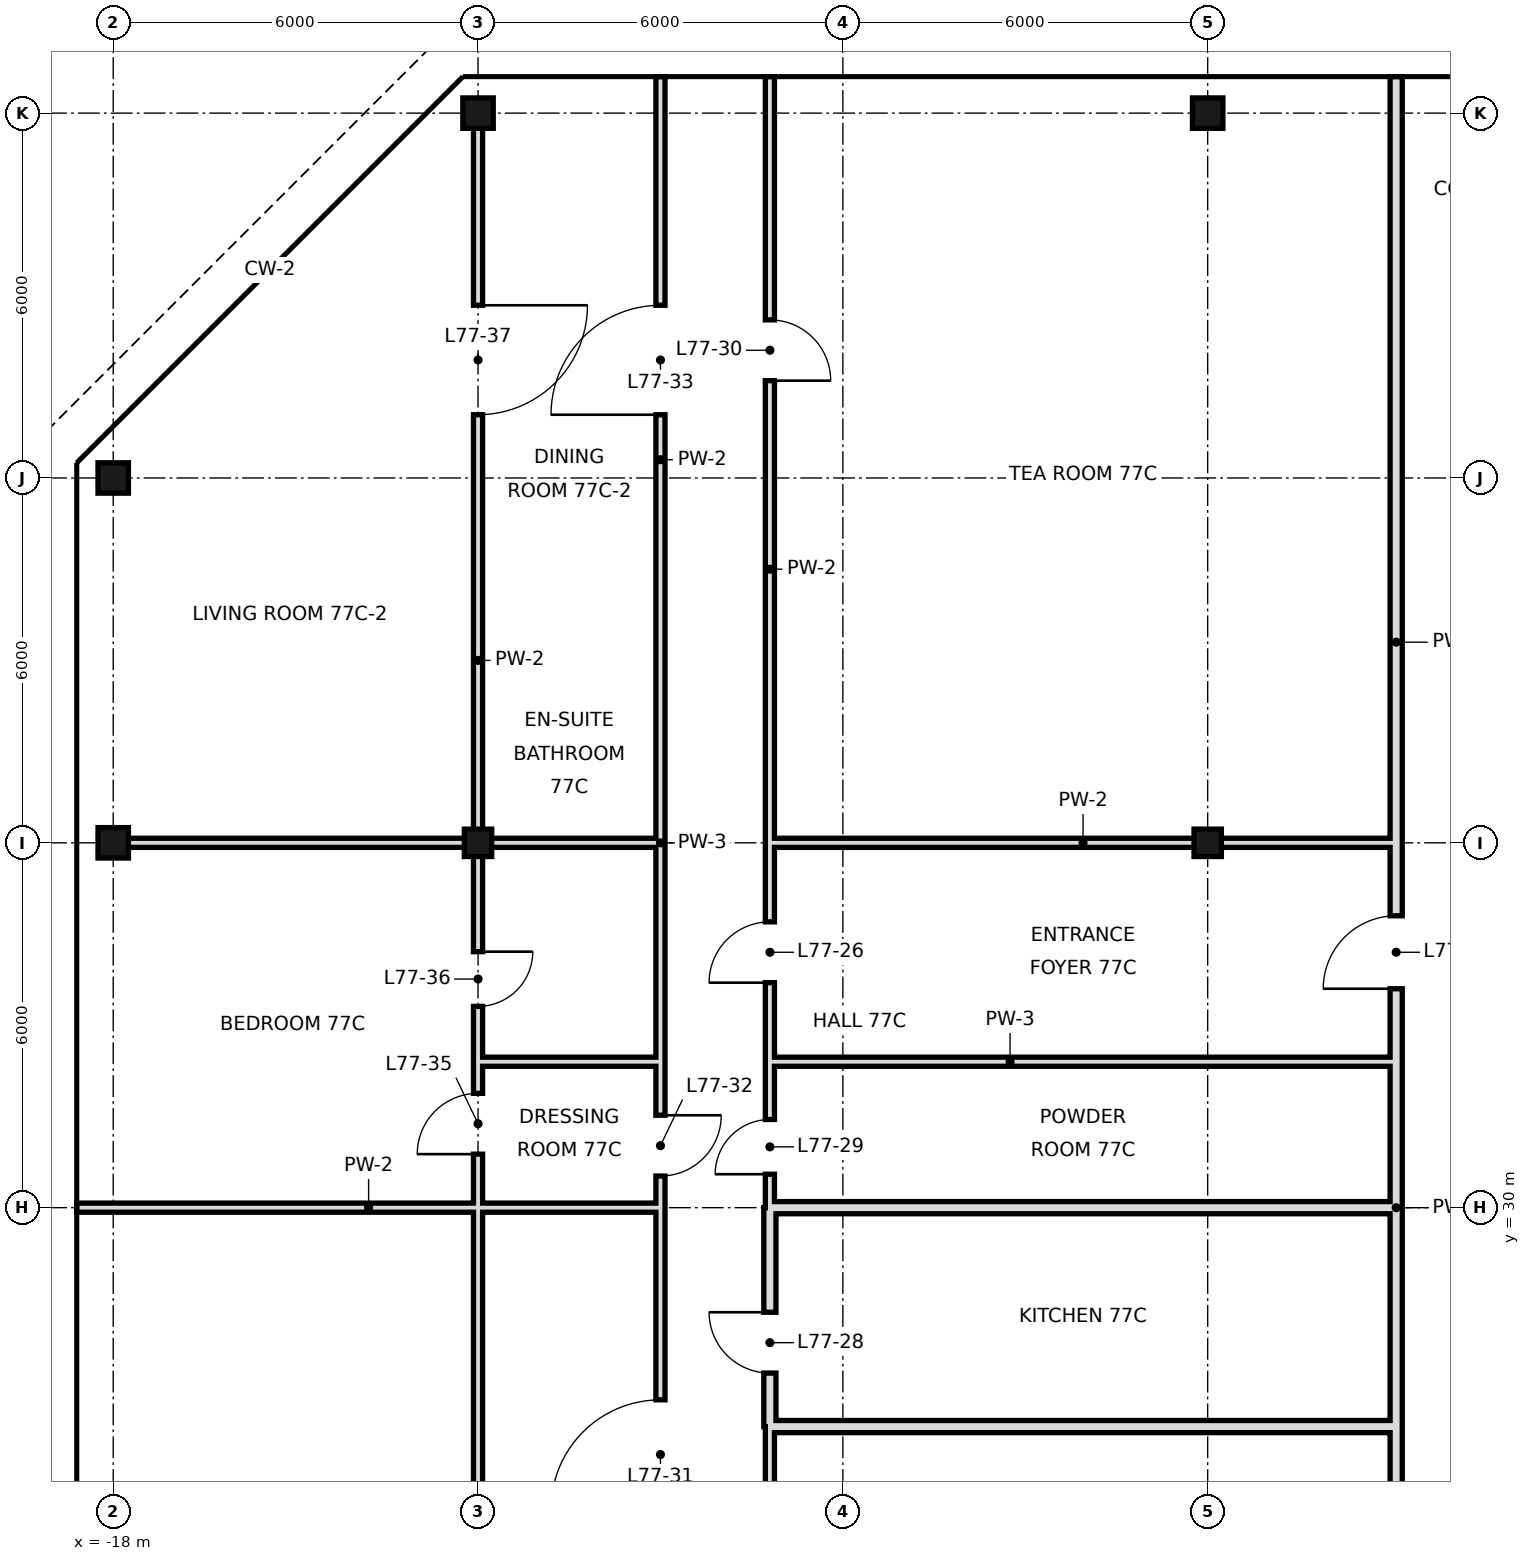
"""IFC4 building model, lengths in metres.
Left out: names, types, materials, properties, quantities, classifications, styles, units other than length and angle.
Written with IfcOpenShell. Run it as: python <this file> out.ifc"""

import sys

from ifc_helpers import new_model, si_unit, direction, frame, frame_2d, origin, origin_2d, place, context, subcontext, project, spatial, rectangle, hollow_rectangle, extrude, element, fill, save


model = new_model("IFC4")
c1 = context("Model", 3, precision=1e-05, world=origin(), true_north=direction((0.0, 1.0)))
c2 = subcontext(c1, "Body", "Model", "MODEL_VIEW")
j1 = project(units=[si_unit("LENGTHUNIT", "METRE"), si_unit("PLANEANGLEUNIT", "RADIAN")], contexts=[c1])
p1 = place(None, origin())
s1 = spatial("IfcSite", under=j1, at=p1, CompositionType="ELEMENT")
p2 = place(p1, origin())
s2 = spatial("IfcBuilding", under=s1, at=p2, CompositionType="ELEMENT")
p3 = place(p2, frame((0.0, 0.0, 323.2)))
s3 = spatial("IfcBuildingStorey", under=s2, at=p3, CompositionType="ELEMENT", Elevation=323.2)
for number, where, z_axis, x_axis in (
    (1, (-18.0, 36.0, 0.0), (0.0, 0.0, 1.0), (1.0, 0.0, 0.0)),
    (2, (-18.0, 42.0, 0.0), (0.0, 0.0, 1.0), (1.0, 0.0, 0.0)),
):
    element("IfcColumn", number, at=place(p3, frame(where, z_axis=z_axis, x_axis=x_axis)), inside=s3, PredefinedType="COLUMN", context=c2, shape_type="SweptSolid", body=[
        extrude(hollow_rectangle(XDim=0.5, YDim=0.5, WallThickness=0.025, at=origin_2d()), origin(), (0.0, 0.0, 1.0), 3.6),
    ])
p4 = place(p3, frame((-12.0, 36.0, 0.0), z_axis=(0.0, 0.0, 1.0), x_axis=(1.0, 0.0, 0.0)))
e3 = element("IfcColumn", 3, at=p4, inside=s3, PredefinedType="COLUMN", context=c2, shape_type="SweptSolid", body=[
    extrude(hollow_rectangle(XDim=0.45, YDim=0.45, WallThickness=0.022, at=origin_2d()), origin(), (0.0, 0.0, 1.0), 3.6),
])
p5 = place(p3, frame((-12.0, 48.0, 0.0), z_axis=(0.0, 0.0, 1.0), x_axis=(1.0, 0.0, 0.0)))
e4 = element("IfcColumn", 4, at=p5, inside=s3, PredefinedType="COLUMN", context=c2, shape_type="SweptSolid", body=[
    extrude(hollow_rectangle(XDim=0.5, YDim=0.5, WallThickness=0.025, at=origin_2d()), origin(), (0.0, 0.0, 1.0), 3.6),
])
p6 = place(p3, frame((0.0, 36.0, 0.0), z_axis=(0.0, 0.0, 1.0), x_axis=(1.0, 0.0, 0.0)))
e5 = element("IfcColumn", 5, at=p6, inside=s3, PredefinedType="COLUMN", context=c2, shape_type="SweptSolid", body=[
    extrude(hollow_rectangle(XDim=0.45, YDim=0.45, WallThickness=0.022, at=origin_2d()), origin(), (0.0, 0.0, 1.0), 3.6),
])
p7 = place(p3, frame((0.0, 48.0, 0.0), z_axis=(0.0, 0.0, 1.0), x_axis=(1.0, 0.0, 0.0)))
e6 = element("IfcColumn", 6, at=p7, inside=s3, PredefinedType="COLUMN", context=c2, shape_type="SweptSolid", body=[
    extrude(hollow_rectangle(XDim=0.5, YDim=0.5, WallThickness=0.025, at=origin_2d()), origin(), (0.0, 0.0, 1.0), 3.6),
])
p8 = place(p3, frame((-12.0, 18.0, 0.0), z_axis=(0.0, 0.0, 1.0), x_axis=(0.0, 1.0, 0.0)))
e7 = element("IfcWall", 7, at=p8, inside=s3, PredefinedType="PARTITIONING", context=c2, shape_type="SweptSolid", body=[
    extrude(rectangle(XDim=14.4, YDim=0.15, at=frame_2d((7.2, 0.0))), origin(), (0.0, 0.0, 1.0), 2.72),
])
p9 = place(p8, frame((3.16, 0.0, 0.0)))
e8 = element("IfcOpeningElement", 8, at=p9, cuts=e7, PredefinedType="OPENING", context=c2, shape_type="SweptSolid", body=[
    extrude(rectangle(XDim=1.8, YDim=2.4, at=frame_2d((0.9, 1.2))), frame((0.0, 0.085, 0.0), z_axis=(0.0, -1.0, 0.0), x_axis=(1.0, 0.0, 0.0)), (0.0, 0.0, 1.0), 0.17),
])
p10 = place(p8, frame((12.88, 0.0, 0.0)))
e9 = element("IfcOpeningElement", 9, at=p10, cuts=e7, PredefinedType="OPENING", context=c2, shape_type="SweptSolid", body=[
    extrude(rectangle(XDim=1.0, YDim=2.4, at=frame_2d((0.5, 1.2))), frame((0.0, 0.085, 0.0), z_axis=(0.0, -1.0, 0.0), x_axis=(1.0, 0.0, 0.0)), (0.0, 0.0, 1.0), 0.17),
])
p11 = place(p3, frame((-12.0, 36.0, 0.0), z_axis=(0.0, 0.0, 1.0), x_axis=(0.0, 1.0, 0.0)))
e10 = element("IfcWall", 10, at=p11, inside=s3, PredefinedType="PARTITIONING", context=c2, shape_type="SweptSolid", body=[
    extrude(rectangle(XDim=12.0, YDim=0.15, at=frame_2d((6.0, 0.0))), origin(), (0.0, 0.0, 1.0), 2.72),
])
p12 = place(p11, frame((7.04, 0.0, 0.0)))
e11 = element("IfcOpeningElement", 11, at=p12, cuts=e10, PredefinedType="OPENING", context=c2, shape_type="SweptSolid", body=[
    extrude(rectangle(XDim=1.8, YDim=2.4, at=frame_2d((0.9, 1.2))), frame((0.0, 0.085, 0.0), z_axis=(0.0, -1.0, 0.0), x_axis=(1.0, 0.0, 0.0)), (0.0, 0.0, 1.0), 0.17),
])
p13 = place(p3, frame((-12.0, 32.4, 0.0), z_axis=(0.0, 0.0, 1.0), x_axis=(0.0, 1.0, 0.0)))
e12 = element("IfcWall", 12, at=p13, inside=s3, PredefinedType="PARTITIONING", context=c2, shape_type="SweptSolid", body=[
    extrude(rectangle(XDim=3.6, YDim=0.15, at=frame_2d((1.8, 0.0))), origin(), (0.0, 0.0, 1.0), 2.72),
])
p14 = place(p13, frame((0.91, 0.0, 0.0)))
e13 = element("IfcOpeningElement", 13, at=p14, cuts=e12, PredefinedType="OPENING", context=c2, shape_type="SweptSolid", body=[
    extrude(rectangle(XDim=0.9, YDim=2.4, at=frame_2d((0.45, 1.2))), frame((0.0, 0.085, 0.0), z_axis=(0.0, -1.0, 0.0), x_axis=(1.0, 0.0, 0.0)), (0.0, 0.0, 1.0), 0.17),
])
p15 = place(p3, frame((-7.2, 26.4, 0.0), z_axis=(0.0, 0.0, 1.0), x_axis=(0.0, 1.0, 0.0)))
e14 = element("IfcWall", 14, at=p15, inside=s3, PredefinedType="SOLIDWALL", context=c2, shape_type="SweptSolid", body=[
    extrude(rectangle(XDim=3.6, YDim=0.2, at=frame_2d((1.8, 0.0))), origin(), (0.0, 0.0, 1.0), 2.72),
])
p16 = place(p15, frame((0.88, 0.0, 0.0)))
e15 = element("IfcOpeningElement", 15, at=p16, cuts=e14, PredefinedType="OPENING", context=c2, shape_type="SweptSolid", body=[
    extrude(rectangle(XDim=1.0, YDim=2.4, at=frame_2d((0.5, 1.2))), frame((0.0, 0.11, 0.0), z_axis=(0.0, -1.0, 0.0), x_axis=(1.0, 0.0, 0.0)), (0.0, 0.0, 1.0), 0.22),
])
p17 = place(p3, frame((-7.2, 18.0, 0.0), z_axis=(0.0, 0.0, 1.0), x_axis=(0.0, 1.0, 0.0)))
e16 = element("IfcWall", 16, at=p17, inside=s3, PredefinedType="PARTITIONING", context=c2, shape_type="SweptSolid", body=[
    extrude(rectangle(XDim=8.4, YDim=0.15, at=frame_2d((4.2, 0.0))), origin(), (0.0, 0.0, 1.0), 3.42),
])
p18 = place(p17, frame((5.08, 0.0, 0.0)))
e17 = element("IfcOpeningElement", 17, at=p18, cuts=e16, PredefinedType="OPENING", context=c2, shape_type="SweptSolid", body=[
    extrude(rectangle(XDim=1.0, YDim=2.4, at=frame_2d((0.5, 1.2))), frame((0.0, 0.085, 0.0), z_axis=(0.0, -1.0, 0.0), x_axis=(1.0, 0.0, 0.0)), (0.0, 0.0, 1.0), 0.17),
])
p19 = place(p3, frame((-7.2, 32.4, 0.0), z_axis=(0.0, 0.0, 1.0), x_axis=(0.0, 1.0, 0.0)))
e18 = element("IfcWall", 18, at=p19, inside=s3, PredefinedType="PARTITIONING", context=c2, shape_type="SweptSolid", body=[
    extrude(rectangle(XDim=16.2, YDim=0.15, at=frame_2d((8.1, 0.0))), origin(), (0.0, 0.0, 1.0), 3.42),
])
p20 = place(p19, frame((1.3, 0.0, 0.0)))
e19 = element("IfcOpeningElement", 19, at=p20, cuts=e18, PredefinedType="OPENING", context=c2, shape_type="SweptSolid", body=[
    extrude(rectangle(XDim=1.0, YDim=2.4, at=frame_2d((0.5, 1.2))), frame((0.0, 0.085, 0.0), z_axis=(0.0, -1.0, 0.0), x_axis=(1.0, 0.0, 0.0)), (0.0, 0.0, 1.0), 0.17),
])
p21 = place(p19, frame((11.2, 0.0, 0.0)))
e20 = element("IfcOpeningElement", 20, at=p21, cuts=e18, PredefinedType="OPENING", context=c2, shape_type="SweptSolid", body=[
    extrude(rectangle(XDim=1.0, YDim=2.4, at=frame_2d((0.5, 1.2))), frame((0.0, 0.085, 0.0), z_axis=(0.0, -1.0, 0.0), x_axis=(1.0, 0.0, 0.0)), (0.0, 0.0, 1.0), 0.17),
])
p22 = place(p3, frame((-7.2, 30.0, 0.0), z_axis=(0.0, 0.0, 1.0), x_axis=(0.0, 1.0, 0.0)))
e21 = element("IfcWall", 21, at=p22, inside=s3, PredefinedType="PARTITIONING", context=c2, shape_type="SweptSolid", body=[
    extrude(rectangle(XDim=2.4, YDim=0.15, at=frame_2d((1.2, 0.0))), origin(), (0.0, 0.0, 1.0), 3.42),
])
p23 = place(p22, frame((0.55, 0.0, 0.0)))
e22 = element("IfcOpeningElement", 22, at=p23, cuts=e21, PredefinedType="OPENING", context=c2, shape_type="SweptSolid", body=[
    extrude(rectangle(XDim=0.9, YDim=2.4, at=frame_2d((0.45, 1.2))), frame((0.0, 0.085, 0.0), z_axis=(0.0, -1.0, 0.0), x_axis=(1.0, 0.0, 0.0)), (0.0, 0.0, 1.0), 0.17),
])
p24 = place(p3, frame((-9.0, 18.0, 0.0), z_axis=(0.0, 0.0, 1.0), x_axis=(0.0, 1.0, 0.0)))
e23 = element("IfcWall", 23, at=p24, inside=s3, PredefinedType="PARTITIONING", context=c2, shape_type="SweptSolid", body=[
    extrude(rectangle(XDim=14.4, YDim=0.15, at=frame_2d((7.2, 0.0))), origin(), (0.0, 0.0, 1.0), 3.42),
])
p25 = place(p24, frame((7.04, 0.0, 0.0)))
e24 = element("IfcOpeningElement", 24, at=p25, cuts=e23, PredefinedType="OPENING", context=c2, shape_type="SweptSolid", body=[
    extrude(rectangle(XDim=1.8, YDim=2.4, at=frame_2d((0.9, 1.2))), frame((0.0, 0.085, 0.0), z_axis=(0.0, -1.0, 0.0), x_axis=(1.0, 0.0, 0.0)), (0.0, 0.0, 1.0), 0.17),
])
p26 = place(p24, frame((12.52, 0.0, 0.0)))
e25 = element("IfcOpeningElement", 25, at=p26, cuts=e23, PredefinedType="OPENING", context=c2, shape_type="SweptSolid", body=[
    extrude(rectangle(XDim=1.0, YDim=2.4, at=frame_2d((0.5, 1.2))), frame((0.0, 0.085, 0.0), z_axis=(0.0, -1.0, 0.0), x_axis=(1.0, 0.0, 0.0)), (0.0, 0.0, 1.0), 0.17),
])
p27 = place(p3, frame((-9.0, 36.0, 0.0), z_axis=(0.0, 0.0, 1.0), x_axis=(0.0, 1.0, 0.0)))
e26 = element("IfcWall", 26, at=p27, inside=s3, PredefinedType="PARTITIONING", context=c2, shape_type="SweptSolid", body=[
    extrude(rectangle(XDim=12.6, YDim=0.15, at=frame_2d((6.3, 0.0))), origin(), (0.0, 0.0, 1.0), 3.42),
])
p28 = place(p27, frame((7.04, 0.0, 0.0)))
e27 = element("IfcOpeningElement", 27, at=p28, cuts=e26, PredefinedType="OPENING", context=c2, shape_type="SweptSolid", body=[
    extrude(rectangle(XDim=1.8, YDim=2.4, at=frame_2d((0.9, 1.2))), frame((0.0, 0.085, 0.0), z_axis=(0.0, -1.0, 0.0), x_axis=(1.0, 0.0, 0.0)), (0.0, 0.0, 1.0), 0.17),
])
p29 = place(p3, frame((-9.0, 32.4, 0.0), z_axis=(0.0, 0.0, 1.0), x_axis=(0.0, 1.0, 0.0)))
e28 = element("IfcWall", 28, at=p29, inside=s3, PredefinedType="PARTITIONING", context=c2, shape_type="SweptSolid", body=[
    extrude(rectangle(XDim=3.6, YDim=0.15, at=frame_2d((1.8, 0.0))), origin(), (0.0, 0.0, 1.0), 3.42),
])
p30 = place(p3, frame((3.1, 18.7, 0.0), z_axis=(0.0, 0.0, 1.0), x_axis=(0.0, 1.0, 0.0)))
e29 = element("IfcWall", 29, at=p30, inside=s3, PredefinedType="SOLIDWALL", context=c2, shape_type="SweptSolid", body=[
    extrude(rectangle(XDim=7.7, YDim=0.2, at=frame_2d((3.85, 0.0))), origin(), (0.0, 0.0, 1.0), 3.42),
])
p31 = place(p3, frame((3.1, 30.0, 0.0), z_axis=(0.0, 0.0, 1.0), x_axis=(0.0, 1.0, 0.0)))
e30 = element("IfcWall", 30, at=p31, inside=s3, PredefinedType="SOLIDWALL", context=c2, shape_type="SweptSolid", body=[
    extrude(rectangle(XDim=18.6, YDim=0.2, at=frame_2d((9.3, 0.0))), origin(), (0.0, 0.0, 1.0), 2.72),
])
p32 = place(p31, frame((3.6, 0.0, 0.0)))
e31 = element("IfcOpeningElement", 31, at=p32, cuts=e30, PredefinedType="OPENING", context=c2, shape_type="SweptSolid", body=[
    extrude(rectangle(XDim=1.2, YDim=2.4, at=frame_2d((0.6, 1.2))), frame((0.0, 0.11, 0.0), z_axis=(0.0, -1.0, 0.0), x_axis=(1.0, 0.0, 0.0)), (0.0, 0.0, 1.0), 0.22),
])
p33 = place(p3, frame((3.1, 26.4, 0.0), z_axis=(0.0, 0.0, 1.0), x_axis=(0.0, 1.0, 0.0)))
e32 = element("IfcWall", 32, at=p33, inside=s3, PredefinedType="SOLIDWALL", context=c2, shape_type="SweptSolid", body=[
    extrude(rectangle(XDim=3.6, YDim=0.2, at=frame_2d((1.8, 0.0))), origin(), (0.0, 0.0, 1.0), 2.97),
])
for number, where, z_axis, x_axis in (
    (33, (-7.2, 26.4, 0.0), (0.0, 0.0, 1.0), (1.0, 0.0, 0.0)),
    (34, (-7.2, 30.0, 0.0), (0.0, 0.0, 1.0), (1.0, 0.0, 0.0)),
):
    element("IfcWall", number, at=place(p3, frame(where, z_axis=z_axis, x_axis=x_axis)), inside=s3, PredefinedType="SOLIDWALL", context=c2, shape_type="SweptSolid", body=[
        extrude(rectangle(XDim=10.3, YDim=0.2, at=frame_2d((5.15, 0.0))), origin(), (0.0, 0.0, 1.0), 2.72),
    ])
p34 = place(p3, frame((-18.6, 30.0, 0.0), z_axis=(0.0, 0.0, 1.0), x_axis=(1.0, 0.0, 0.0)))
e35 = element("IfcWall", 35, at=p34, inside=s3, PredefinedType="PARTITIONING", context=c2, shape_type="SweptSolid", body=[
    extrude(rectangle(XDim=9.6, YDim=0.15, at=frame_2d((4.8, 0.0))), origin(), (0.0, 0.0, 1.0), 2.72),
])
p35 = place(p3, frame((-12.0, 32.4, 0.0), z_axis=(0.0, 0.0, 1.0), x_axis=(1.0, 0.0, 0.0)))
e36 = element("IfcWall", 36, at=p35, inside=s3, PredefinedType="PARTITIONING", context=c2, shape_type="SweptSolid", body=[
    extrude(rectangle(XDim=3.0, YDim=0.15, at=frame_2d((1.5, 0.0))), origin(), (0.0, 0.0, 1.0), 3.42),
])
p36 = place(p3, frame((-7.2, 32.4, 0.0), z_axis=(0.0, 0.0, 1.0), x_axis=(1.0, 0.0, 0.0)))
e37 = element("IfcWall", 37, at=p36, inside=s3, PredefinedType="PARTITIONING", context=c2, shape_type="SweptSolid", body=[
    extrude(rectangle(XDim=10.3, YDim=0.15, at=frame_2d((5.15, 0.0))), origin(), (0.0, 0.0, 1.0), 3.42),
])
p37 = place(p3, frame((-18.0, 36.0, 0.0), z_axis=(0.0, 0.0, 1.0), x_axis=(1.0, 0.0, 0.0)))
e38 = element("IfcWall", 38, at=p37, inside=s3, PredefinedType="PARTITIONING", context=c2, shape_type="SweptSolid", body=[
    extrude(rectangle(XDim=6.0, YDim=0.15, at=frame_2d((3.0, 0.0))), origin(), (0.0, 0.0, 1.0), 2.97),
])
p38 = place(p3, frame((-7.2, 36.0, 0.0), z_axis=(0.0, 0.0, 1.0), x_axis=(1.0, 0.0, 0.0)))
e39 = element("IfcWall", 39, at=p38, inside=s3, PredefinedType="PARTITIONING", context=c2, shape_type="SweptSolid", body=[
    extrude(rectangle(XDim=10.3, YDim=0.15, at=frame_2d((5.15, 0.0))), origin(), (0.0, 0.0, 1.0), 2.72),
])
p39 = place(p3, frame((-12.0, 36.0, 0.0), z_axis=(0.0, 0.0, 1.0), x_axis=(1.0, 0.0, 0.0)))
e40 = element("IfcWall", 40, at=p39, inside=s3, PredefinedType="PARTITIONING", context=c2, shape_type="SweptSolid", body=[
    extrude(rectangle(XDim=3.0, YDim=0.15, at=frame_2d((1.5, 0.0))), origin(), (0.0, 0.0, 1.0), 2.72),
])
p40 = place(p20, origin())
e41 = element("IfcDoor", 41, at=p40, inside=s3, OperationType="SINGLE_SWING_LEFT", PredefinedType="DOOR", context=c2, shape_type="SweptSolid", body=[
    extrude(rectangle(XDim=1.0, YDim=2.4, at=frame_2d((0.5, 1.2))), frame((0.0, 0.025, 0.0), z_axis=(0.0, -1.0, 0.0), x_axis=(1.0, 0.0, 0.0)), (0.0, 0.0, 1.0), 0.05),
])
fill(e19, e41)
p41 = place(p16, frame((1.0, 0.0, 0.0), z_axis=(0.0, 0.0, 1.0), x_axis=(-1.0, 0.0, 0.0)))
e42 = element("IfcDoor", 42, at=p41, inside=s3, OperationType="SINGLE_SWING_LEFT", PredefinedType="DOOR", context=c2, shape_type="SweptSolid", body=[
    extrude(rectangle(XDim=1.0, YDim=2.4, at=frame_2d((0.5, 1.2))), frame((0.0, 0.025, 0.0), z_axis=(0.0, -1.0, 0.0), x_axis=(1.0, 0.0, 0.0)), (0.0, 0.0, 1.0), 0.05),
])
fill(e15, e42)
p42 = place(p23, origin())
e43 = element("IfcDoor", 43, at=p42, inside=s3, OperationType="SINGLE_SWING_LEFT", PredefinedType="DOOR", context=c2, shape_type="SweptSolid", body=[
    extrude(rectangle(XDim=0.9, YDim=2.4, at=frame_2d((0.45, 1.2))), frame((0.0, 0.025, 0.0), z_axis=(0.0, -1.0, 0.0), x_axis=(1.0, 0.0, 0.0)), (0.0, 0.0, 1.0), 0.05),
])
fill(e22, e43)
p43 = place(p21, frame((1.0, 0.0, 0.0), z_axis=(0.0, 0.0, 1.0), x_axis=(-1.0, 0.0, 0.0)))
e44 = element("IfcDoor", 44, at=p43, inside=s3, OperationType="SINGLE_SWING_RIGHT", PredefinedType="DOOR", context=c2, shape_type="SweptSolid", body=[
    extrude(rectangle(XDim=1.0, YDim=2.4, at=frame_2d((0.5, 1.2))), frame((0.0, 0.025, 0.0), z_axis=(0.0, -1.0, 0.0), x_axis=(1.0, 0.0, 0.0)), (0.0, 0.0, 1.0), 0.05),
])
fill(e20, e44)
p44 = place(p25, origin())
e45 = element("IfcDoor", 45, at=p44, inside=s3, OperationType="SINGLE_SWING_LEFT", PredefinedType="DOOR", context=c2, shape_type="SweptSolid", body=[
    extrude(rectangle(XDim=1.8, YDim=2.4, at=frame_2d((0.9, 1.2))), frame((0.0, 0.025, 0.0), z_axis=(0.0, -1.0, 0.0), x_axis=(1.0, 0.0, 0.0)), (0.0, 0.0, 1.0), 0.05),
])
fill(e24, e45)
p45 = place(p26, origin())
e46 = element("IfcDoor", 46, at=p45, inside=s3, OperationType="SINGLE_SWING_RIGHT", PredefinedType="DOOR", context=c2, shape_type="SweptSolid", body=[
    extrude(rectangle(XDim=1.0, YDim=2.4, at=frame_2d((0.5, 1.2))), frame((0.0, 0.025, 0.0), z_axis=(0.0, -1.0, 0.0), x_axis=(1.0, 0.0, 0.0)), (0.0, 0.0, 1.0), 0.05),
])
fill(e25, e46)
p46 = place(p28, origin())
e47 = element("IfcDoor", 47, at=p46, inside=s3, OperationType="SINGLE_SWING_LEFT", PredefinedType="DOOR", context=c2, shape_type="SweptSolid", body=[
    extrude(rectangle(XDim=1.8, YDim=2.4, at=frame_2d((0.9, 1.2))), frame((0.0, 0.025, 0.0), z_axis=(0.0, -1.0, 0.0), x_axis=(1.0, 0.0, 0.0)), (0.0, 0.0, 1.0), 0.05),
])
fill(e27, e47)
p47 = place(p10, origin())
e48 = element("IfcDoor", 48, at=p47, inside=s3, OperationType="SINGLE_SWING_LEFT", PredefinedType="DOOR", context=c2, shape_type="SweptSolid", body=[
    extrude(rectangle(XDim=1.0, YDim=2.4, at=frame_2d((0.5, 1.2))), frame((0.0, 0.025, 0.0), z_axis=(0.0, -1.0, 0.0), x_axis=(1.0, 0.0, 0.0)), (0.0, 0.0, 1.0), 0.05),
])
fill(e9, e48)
p48 = place(p14, origin())
e49 = element("IfcDoor", 49, at=p48, inside=s3, OperationType="SINGLE_SWING_RIGHT", PredefinedType="DOOR", context=c2, shape_type="SweptSolid", body=[
    extrude(rectangle(XDim=0.9, YDim=2.4, at=frame_2d((0.45, 1.2))), frame((0.0, 0.025, 0.0), z_axis=(0.0, -1.0, 0.0), x_axis=(1.0, 0.0, 0.0)), (0.0, 0.0, 1.0), 0.05),
])
fill(e13, e49)
p49 = place(p12, origin())
e50 = element("IfcDoor", 50, at=p49, inside=s3, OperationType="SINGLE_SWING_RIGHT", PredefinedType="DOOR", context=c2, shape_type="SweptSolid", body=[
    extrude(rectangle(XDim=1.8, YDim=2.4, at=frame_2d((0.9, 1.2))), frame((0.0, 0.025, 0.0), z_axis=(0.0, -1.0, 0.0), x_axis=(1.0, 0.0, 0.0)), (0.0, 0.0, 1.0), 0.05),
])
fill(e11, e50)
p50 = place(p32, origin())
e51 = element("IfcDoor", 51, at=p50, inside=s3, OperationType="SINGLE_SWING_LEFT", PredefinedType="DOOR", context=c2, shape_type="SweptSolid", body=[
    extrude(rectangle(XDim=1.2, YDim=2.4, at=frame_2d((0.6, 1.2))), frame((0.0, 0.025, 0.0), z_axis=(0.0, -1.0, 0.0), x_axis=(1.0, 0.0, 0.0)), (0.0, 0.0, 1.0), 0.05),
])
fill(e31, e51)
save(model, sys.argv[1])
